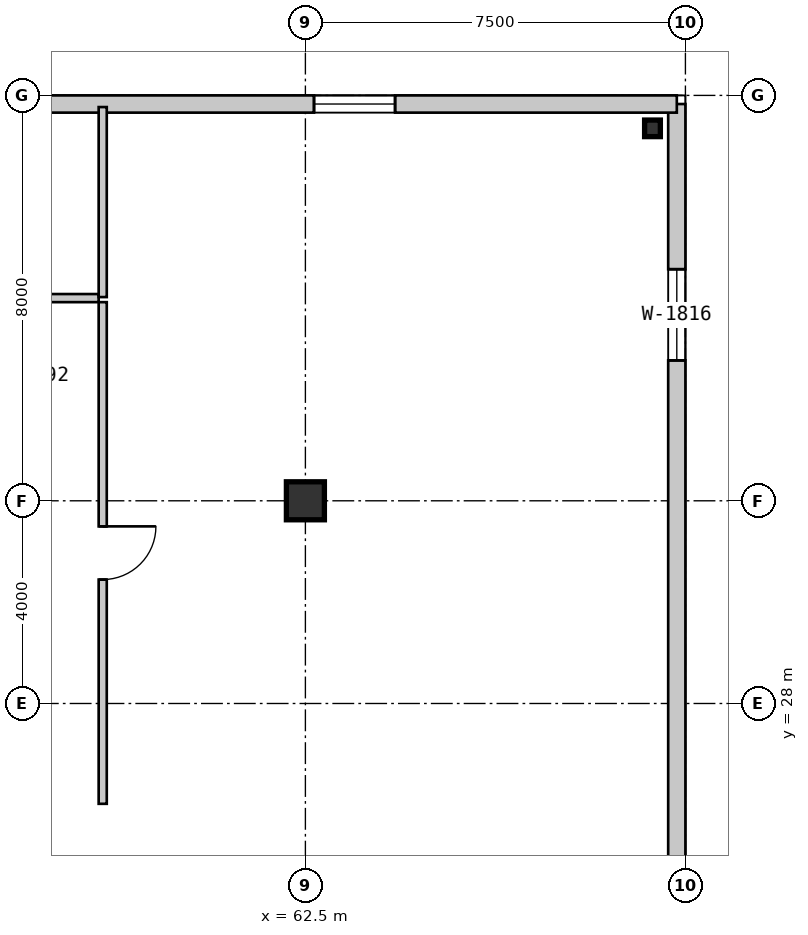
"""IFC4 building model, lengths in metres.
Left out: names, types, materials, properties, quantities, classifications, styles, units other than length and angle.
Written with IfcOpenShell. Run it as: python <this file> out.ifc"""

import sys

from ifc_helpers import new_model, si_unit, direction, frame, frame_2d, origin, origin_2d, place, context, subcontext, project, spatial, rectangle, circle, i_section, extrude, source, transform, mapped, element, fill, save


model = new_model("IFC4")
c1 = context("Model", 3, precision=1e-05, world=origin(), true_north=direction((0.0, 1.0)))
c2 = subcontext(c1, "Body", "Model", "MODEL_VIEW")
j1 = project(units=[si_unit("LENGTHUNIT", "METRE"), si_unit("PLANEANGLEUNIT", "RADIAN")], contexts=[c1])
p1 = place(None, origin())
s1 = spatial("IfcSite", under=j1, at=p1, CompositionType="ELEMENT")
p2 = place(p1, origin())
s2 = spatial("IfcBuilding", under=s1, at=p2, CompositionType="ELEMENT")
p3 = place(p2, frame((0.0, 0.0, 12.95)))
s3 = spatial("IfcBuildingStorey", under=s2, at=p3, CompositionType="ELEMENT", Elevation=12.95)
m1 = source(origin(), c2, "Body", "SweptSolid", [
    extrude(circle(Radius=0.375, at=origin_2d()), origin(), (0.0, 0.0, 1.0), 3.85),
])
p4 = place(p3, frame((62.5, 32.0, 0.0), z_axis=(0.0, 0.0, 1.0), x_axis=(1.0, 0.0, 0.0)))
e1 = element("IfcColumn", 1, at=p4, inside=s3, PredefinedType="COLUMN", context=c2, shape_type="MappedRepresentation", body=[
    mapped(m1, transform((0.0, 0.0, 0.0), scale=1.0)),
])
m2 = source(origin(), c2, "Body", "SweptSolid", [
    extrude(i_section(OverallWidth=0.311, OverallDepth=0.327, WebThickness=0.016, FlangeThickness=0.025, at=origin_2d()), origin(), (0.0, 0.0, 1.0), 3.85),
])
p5 = place(p3, frame((69.35, 39.35, 0.0), z_axis=(0.0, 0.0, 1.0), x_axis=(1.0, 0.0, 0.0)))
e2 = element("IfcColumn", 2, at=p5, inside=s3, PredefinedType="COLUMN", context=c2, shape_type="MappedRepresentation", body=[
    mapped(m2, transform((0.0, 0.0, 0.0), scale=1.0)),
])
m3 = source(origin(), c2, "Body", "SweptSolid", [
    extrude(rectangle(XDim=39.66, YDim=0.34, at=frame_2d((19.83, 0.0))), origin(), (0.0, 0.0, 1.0), 3.43),
])
p6 = place(p3, frame((69.83, 0.17, 0.0), z_axis=(0.0, 0.0, 1.0), x_axis=(0.0, 1.0, 0.0)))
e3 = element("IfcWall", 3, at=p6, inside=s3, PredefinedType="SOLIDWALL", context=c2, shape_type="MappedRepresentation", body=[
    mapped(m3, transform((0.0, 0.0, 0.0), scale=1.0)),
])
m4 = source(origin(), c2, "Body", "SweptSolid", [
    extrude(rectangle(XDim=1.5, YDim=1.5, at=frame_2d((0.75, 0.75))), frame((0.0, 0.18, 0.0), z_axis=(0.0, -1.0, 0.0), x_axis=(1.0, 0.0, 0.0)), (0.0, 0.0, 1.0), 0.36),
])
p7 = place(p6, frame((3.2, 0.0, 0.55)))
e4 = element("IfcOpeningElement", 4, at=p7, cuts=e3, PredefinedType="OPENING", context=c2, shape_type="MappedRepresentation", body=[
    mapped(m4, transform((0.0, 0.0, 0.0), scale=1.0)),
])
m5 = source(origin(), c2, "Body", "SweptSolid", [
    extrude(rectangle(XDim=1.2, YDim=1.5, at=frame_2d((0.6, 0.75))), frame((0.0, 0.18, 0.0), z_axis=(0.0, -1.0, 0.0), x_axis=(1.0, 0.0, 0.0)), (0.0, 0.0, 1.0), 0.36),
])
p8 = place(p6, frame((7.8, 0.0, 0.55)))
e5 = element("IfcOpeningElement", 5, at=p8, cuts=e3, PredefinedType="OPENING", context=c2, shape_type="MappedRepresentation", body=[
    mapped(m5, transform((0.0, 0.0, 0.0), scale=1.0)),
])
m6 = source(origin(), c2, "Body", "SweptSolid", [
    extrude(rectangle(XDim=2.4, YDim=1.8, at=frame_2d((1.2, 0.9))), frame((0.0, 0.18, 0.0), z_axis=(0.0, -1.0, 0.0), x_axis=(1.0, 0.0, 0.0)), (0.0, 0.0, 1.0), 0.36),
])
p9 = place(p6, frame((21.2, 0.0, 0.55)))
e6 = element("IfcOpeningElement", 6, at=p9, cuts=e3, PredefinedType="OPENING", context=c2, shape_type="MappedRepresentation", body=[
    mapped(m6, transform((0.0, 0.0, 0.0), scale=1.0)),
])
m7 = source(origin(), c2, "Body", "SweptSolid", [
    extrude(rectangle(XDim=1.8, YDim=1.6, at=frame_2d((0.9, 0.8))), frame((0.0, 0.18, 0.0), z_axis=(0.0, -1.0, 0.0), x_axis=(1.0, 0.0, 0.0)), (0.0, 0.0, 1.0), 0.36),
])
p10 = place(p6, frame((34.6, 0.0, 0.55)))
e7 = element("IfcOpeningElement", 7, at=p10, cuts=e3, PredefinedType="OPENING", context=c2, shape_type="MappedRepresentation", body=[
    mapped(m7, transform((0.0, 0.0, 0.0), scale=1.0)),
])
m8 = source(origin(), c2, "Body", "SweptSolid", [
    extrude(rectangle(XDim=69.66, YDim=0.34, at=frame_2d((34.83, 0.0))), origin(), (0.0, 0.0, 1.0), 3.43),
])
p11 = place(p3, frame((0.17, 39.83, 0.0), z_axis=(0.0, 0.0, 1.0), x_axis=(1.0, 0.0, 0.0)))
e8 = element("IfcWall", 8, at=p11, inside=s3, PredefinedType="SOLIDWALL", context=c2, shape_type="MappedRepresentation", body=[
    mapped(m8, transform((0.0, 0.0, 0.0), scale=1.0)),
])
m9 = source(origin(), c2, "Body", "SweptSolid", [
    extrude(rectangle(XDim=1.6, YDim=1.2, at=frame_2d((0.8, 0.6))), frame((0.0, 0.18, 0.0), z_axis=(0.0, -1.0, 0.0), x_axis=(1.0, 0.0, 0.0)), (0.0, 0.0, 1.0), 0.36),
])
p12 = place(p11, frame((4.5, 0.0, 0.55)))
e9 = element("IfcOpeningElement", 9, at=p12, cuts=e8, PredefinedType="OPENING", context=c2, shape_type="MappedRepresentation", body=[
    mapped(m9, transform((0.0, 0.0, 0.0), scale=1.0)),
])
p13 = place(p11, frame((22.5, 0.0, 0.55)))
e10 = element("IfcOpeningElement", 10, at=p13, cuts=e8, PredefinedType="OPENING", context=c2, shape_type="MappedRepresentation", body=[
    mapped(m9, transform((0.0, 0.0, 0.0), scale=1.0)),
])
p14 = place(p11, frame((29.0, 0.0, 0.55)))
e11 = element("IfcOpeningElement", 11, at=p14, cuts=e8, PredefinedType="OPENING", context=c2, shape_type="MappedRepresentation", body=[
    mapped(m9, transform((0.0, 0.0, 0.0), scale=1.0)),
])
p15 = place(p11, frame((40.5, 0.0, 0.55)))
e12 = element("IfcOpeningElement", 12, at=p15, cuts=e8, PredefinedType="OPENING", context=c2, shape_type="MappedRepresentation", body=[
    mapped(m9, transform((0.0, 0.0, 0.0), scale=1.0)),
])
p16 = place(p11, frame((46.5, 0.0, 0.55)))
e13 = element("IfcOpeningElement", 13, at=p16, cuts=e8, PredefinedType="OPENING", context=c2, shape_type="MappedRepresentation", body=[
    mapped(m9, transform((0.0, 0.0, 0.0), scale=1.0)),
])
p17 = place(p11, frame((62.5, 0.0, 0.55)))
e14 = element("IfcOpeningElement", 14, at=p17, cuts=e8, PredefinedType="OPENING", context=c2, shape_type="MappedRepresentation", body=[
    mapped(m9, transform((0.0, 0.0, 0.0), scale=1.0)),
])
m10 = source(origin(), c2, "Body", "SweptSolid", [
    extrude(rectangle(XDim=9.9, YDim=0.16, at=frame_2d((4.95, 0.0))), origin(), (0.0, 0.0, 1.0), 3.43),
])
p18 = place(p3, frame((58.5, 35.92, 0.0), z_axis=(0.0, 0.0, 1.0), x_axis=(0.0, -1.0, 0.0)))
e15 = element("IfcWall", 15, at=p18, inside=s3, PredefinedType="PARTITIONING", context=c2, shape_type="MappedRepresentation", body=[
    mapped(m10, transform((0.0, 0.0, 0.0), scale=1.0)),
])
m11 = source(origin(), c2, "Body", "SweptSolid", [
    extrude(rectangle(XDim=1.05, YDim=2.1, at=frame_2d((0.525, 1.05))), frame((0.0, 0.09, 0.0), z_axis=(0.0, -1.0, 0.0), x_axis=(1.0, 0.0, 0.0)), (0.0, 0.0, 1.0), 0.18),
])
p19 = place(p18, frame((4.425, 0.0, 0.0)))
e16 = element("IfcOpeningElement", 16, at=p19, cuts=e15, PredefinedType="OPENING", context=c2, shape_type="MappedRepresentation", body=[
    mapped(m11, transform((0.0, 0.0, 0.0), scale=1.0)),
])
m12 = source(origin(), c2, "Body", "SweptSolid", [
    extrude(rectangle(XDim=2.84, YDim=0.16, at=frame_2d((1.42, 0.0))), origin(), (0.0, 0.0, 1.0), 3.43),
])
p20 = place(p3, frame((55.58, 36.0, 0.0), z_axis=(0.0, 0.0, 1.0), x_axis=(1.0, 0.0, 0.0)))
e17 = element("IfcWall", 17, at=p20, inside=s3, PredefinedType="PARTITIONING", context=c2, shape_type="MappedRepresentation", body=[
    mapped(m12, transform((0.0, 0.0, 0.0), scale=1.0)),
])
m13 = source(origin(), c2, "Body", "SweptSolid", [
    extrude(rectangle(XDim=3.75, YDim=0.16, at=frame_2d((1.875, 0.0))), origin(), (0.0, 0.0, 1.0), 3.43),
])
p21 = place(p3, frame((58.5, 36.02, 0.0), z_axis=(0.0, 0.0, 1.0), x_axis=(0.0, 1.0, 0.0)))
e18 = element("IfcWall", 18, at=p21, inside=s3, PredefinedType="PARTITIONING", context=c2, shape_type="MappedRepresentation", body=[
    mapped(m13, transform((0.0, 0.0, 0.0), scale=1.0)),
])
m14 = source(origin(), c2, "Body", "SweptSolid", [
    extrude(rectangle(XDim=1.8, YDim=1.6, at=frame_2d((0.9, 0.8))), frame((0.0, 0.03, 0.0), z_axis=(0.0, -1.0, 0.0), x_axis=(1.0, 0.0, 0.0)), (0.0, 0.0, 1.0), 0.06),
])
p22 = place(p10, origin())
e19 = element("IfcWindow", 19, at=p22, inside=s3, PartitioningType="SINGLE_PANEL", PredefinedType="WINDOW", context=c2, shape_type="MappedRepresentation", body=[
    mapped(m14, transform((0.0, 0.0, 0.0), scale=1.0)),
])
fill(e7, e19)
m15 = source(origin(), c2, "Body", "SweptSolid", [
    extrude(rectangle(XDim=1.6, YDim=1.2, at=frame_2d((0.8, 0.6))), frame((0.0, 0.03, 0.0), z_axis=(0.0, -1.0, 0.0), x_axis=(1.0, 0.0, 0.0)), (0.0, 0.0, 1.0), 0.06),
])
p23 = place(p17, origin())
e20 = element("IfcWindow", 20, at=p23, inside=s3, PartitioningType="SINGLE_PANEL", PredefinedType="WINDOW", context=c2, shape_type="MappedRepresentation", body=[
    mapped(m15, transform((0.0, 0.0, 0.0), scale=1.0)),
])
fill(e14, e20)
m16 = source(origin(), c2, "Body", "SweptSolid", [
    extrude(rectangle(XDim=1.05, YDim=2.1, at=frame_2d((0.525, 1.05))), frame((0.0, 0.025, 0.0), z_axis=(0.0, -1.0, 0.0), x_axis=(1.0, 0.0, 0.0)), (0.0, 0.0, 1.0), 0.05),
])
p24 = place(p19, origin())
e21 = element("IfcDoor", 21, at=p24, inside=s3, OperationType="SINGLE_SWING_LEFT", PredefinedType="DOOR", context=c2, shape_type="MappedRepresentation", body=[
    mapped(m16, transform((0.0, 0.0, 0.0), scale=1.0)),
])
fill(e16, e21)
save(model, sys.argv[1])
